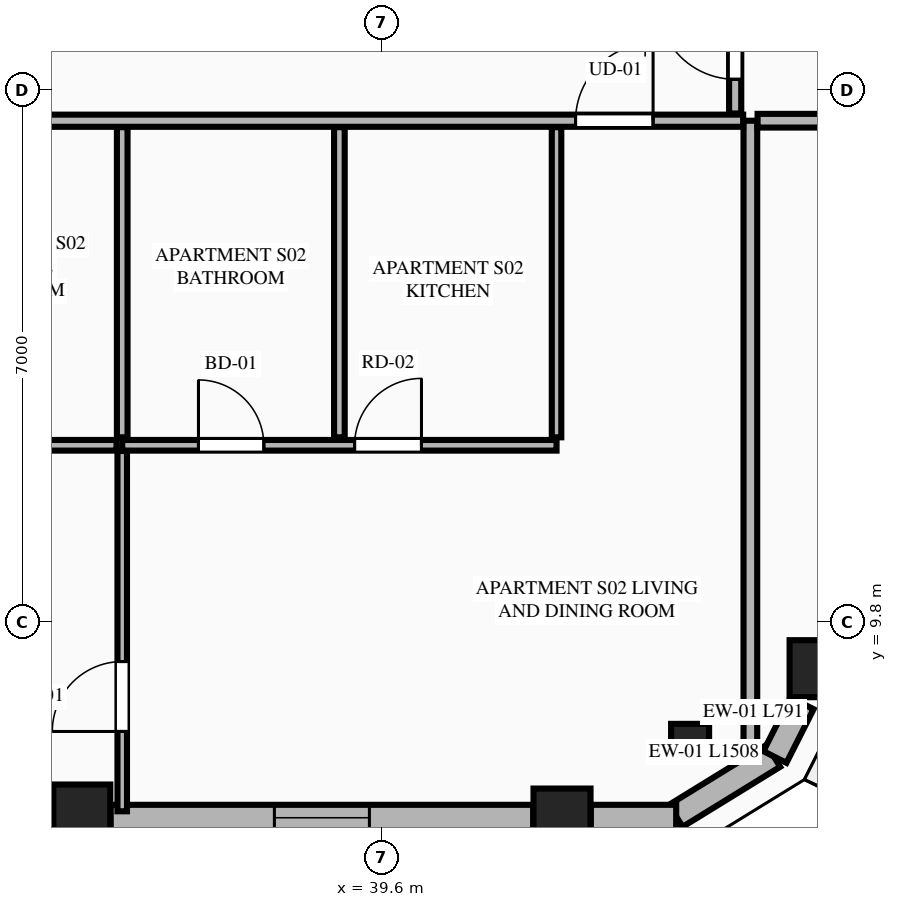
"""IFC4 building model, lengths in metres.
Left out: names, types, materials, properties, quantities, classifications, styles, units other than length and angle.
Written with IfcOpenShell. Run it as: python <this file> out.ifc"""

import sys

from ifc_helpers import new_model, si_unit, direction, frame, frame_2d, origin, origin_2d, place, context, subcontext, project, spatial, rectangle, extrude, element, fill, save


model = new_model("IFC4")
c1 = context("Model", 3, precision=1e-05, world=origin(), true_north=direction((0.0, 1.0)))
c2 = subcontext(c1, "Body", "Model", "MODEL_VIEW")
j1 = project(units=[si_unit("LENGTHUNIT", "METRE"), si_unit("PLANEANGLEUNIT", "RADIAN")], contexts=[c1])
p1 = place(None, origin())
s1 = spatial("IfcSite", under=j1, at=p1, CompositionType="ELEMENT")
p2 = place(p1, origin())
s2 = spatial("IfcBuilding", under=s1, at=p2, CompositionType="ELEMENT")
p3 = place(p2, frame((0.0, 0.0, 237.95)))
s3 = spatial("IfcBuildingStorey", under=s2, at=p3, CompositionType="ELEMENT", Elevation=237.95)
for number, where, z_axis, x_axis in (
    (1, (35.654, 7.292, 0.0), (0.0, 0.0, 1.0), (1.0, 0.0, 0.0)),
    (2, (41.972, 7.239, 0.0), (0.0, 0.0, 1.0), (1.0, 0.0, 0.0)),
    (3, (45.341, 9.191, 0.0), (0.0, 0.0, 1.0), (1.0, 0.0, 0.0)),
):
    element("IfcColumn", number, at=place(p3, frame(where, z_axis=z_axis, x_axis=x_axis)), inside=s3, PredefinedType="COLUMN", context=c2, shape_type="SweptSolid", body=[
        extrude(rectangle(XDim=0.75, YDim=0.75, at=origin_2d()), origin(), (0.0, 0.0, 1.0), 3.65),
    ])
p4 = place(p3, frame((43.657, 8.215, 0.0), z_axis=(0.0, 0.0, 1.0), x_axis=(0.865256437757, 0.501329529272, 0.0)))
e4 = element("IfcColumn", 4, at=p4, inside=s3, PredefinedType="PILASTER", context=c2, shape_type="SweptSolid", body=[
    extrude(rectangle(XDim=0.5, YDim=0.35, at=origin_2d()), origin(), (0.0, 0.0, 1.0), 3.65),
])
p5 = place(p3, frame((43.469, 7.255, 0.0), z_axis=(0.0, 0.0, 1.0), x_axis=(0.851680557619, 0.52406128246, 0.0)))
e5 = element("IfcWall", 5, at=p5, inside=s3, PredefinedType="STANDARD", context=c2, shape_type="SweptSolid", body=[
    extrude(rectangle(XDim=1.508, YDim=0.34, at=frame_2d((0.754, 0.0))), origin(), (0.0, 0.0, 1.0), 3.45),
])
p6 = place(p3, frame((29.525, 7.23, 0.0), z_axis=(0.0, 0.0, 1.0), x_axis=(1.0, 0.0, 0.0)))
e6 = element("IfcWall", 6, at=p6, inside=s3, PredefinedType="STANDARD", context=c2, shape_type="SweptSolid", body=[
    extrude(rectangle(XDim=5.75, YDim=0.34, at=frame_2d((2.875, 0.0))), origin(), (0.0, 0.0, 1.0), 2.983),
])
p7 = place(p6, frame((2.175, 0.0, 0.75)))
e7 = element("IfcOpeningElement", 7, at=p7, cuts=e6, PredefinedType="OPENING", context=c2, shape_type="SweptSolid", body=[
    extrude(rectangle(XDim=1.4, YDim=2.05, at=frame_2d((0.7, 1.025))), frame((0.0, 0.18, 0.0), z_axis=(0.0, -1.0, 0.0), x_axis=(1.0, 0.0, 0.0)), (0.0, 0.0, 1.0), 0.36),
])
p8 = place(p3, frame((36.033, 7.23, 0.0), z_axis=(0.0, 0.0, 1.0), x_axis=(1.0, 0.0, 0.0)))
e8 = element("IfcWall", 8, at=p8, inside=s3, PredefinedType="STANDARD", context=c2, shape_type="SweptSolid", body=[
    extrude(rectangle(XDim=5.56, YDim=0.34, at=frame_2d((2.78, 0.0))), origin(), (0.0, 0.0, 1.0), 2.983),
])
p9 = place(p8, frame((2.155, 0.0, 0.75)))
e9 = element("IfcOpeningElement", 9, at=p9, cuts=e8, PredefinedType="OPENING", context=c2, shape_type="SweptSolid", body=[
    extrude(rectangle(XDim=1.25, YDim=1.95, at=frame_2d((0.625, 0.975))), frame((0.0, 0.18, 0.0), z_axis=(0.0, -1.0, 0.0), x_axis=(1.0, 0.0, 0.0)), (0.0, 0.0, 1.0), 0.36),
])
p10 = place(p3, frame((42.351, 7.23, 0.0), z_axis=(0.0, 0.0, 1.0), x_axis=(1.0, 0.0, 0.0)))
e10 = element("IfcWall", 10, at=p10, inside=s3, PredefinedType="STANDARD", context=c2, shape_type="SweptSolid", body=[
    extrude(rectangle(XDim=1.123, YDim=0.34, at=frame_2d((0.562, 0.0))), origin(), (0.0, 0.0, 1.0), 3.45),
])
p11 = place(p3, frame((44.773, 8.029, 0.0), z_axis=(0.0, 0.0, 1.0), x_axis=(0.451159191899, 0.892443490404, 0.0)))
e11 = element("IfcWall", 11, at=p11, inside=s3, PredefinedType="STANDARD", context=c2, shape_type="SweptSolid", body=[
    extrude(rectangle(XDim=0.791, YDim=0.34, at=frame_2d((0.396, 0.0))), origin(), (0.0, 0.0, 1.0), 3.45),
])
p12 = place(p3, frame((44.45, 8.119, 0.0), z_axis=(0.0, 0.0, 1.0), x_axis=(0.0, 1.0, 0.0)))
e12 = element("IfcWall", 12, at=p12, inside=s3, PredefinedType="PARTITIONING", context=c2, shape_type="SweptSolid", body=[
    extrude(rectangle(XDim=8.281, YDim=0.18, at=frame_2d((4.141, 0.0))), origin(), (0.0, 0.0, 1.0), 3.45),
])
p13 = place(p3, frame((29.241, 16.4, 0.0), z_axis=(0.0, 0.0, 1.0), x_axis=(1.0, 0.0, 0.0)))
e13 = element("IfcWall", 13, at=p13, inside=s3, PredefinedType="PARTITIONING", context=c2, shape_type="SweptSolid", body=[
    extrude(rectangle(XDim=15.114, YDim=0.16, at=frame_2d((7.557, 0.0))), origin(), (0.0, 0.0, 1.0), 3.45),
])
p14 = place(p13, frame((12.909, 0.0, 0.0)))
e14 = element("IfcOpeningElement", 14, at=p14, cuts=e13, PredefinedType="OPENING", context=c2, shape_type="SweptSolid", body=[
    extrude(rectangle(XDim=1.02, YDim=2.25, at=frame_2d((0.51, 1.125))), frame((0.0, 0.09, 0.0), z_axis=(0.0, -1.0, 0.0), x_axis=(1.0, 0.0, 0.0)), (0.0, 0.0, 1.0), 0.18),
])
p15 = place(p3, frame((41.9, 12.235, 0.0), z_axis=(0.0, 0.0, 1.0), x_axis=(0.0, 1.0, 0.0)))
e15 = element("IfcWall", 15, at=p15, inside=s3, PredefinedType="PARTITIONING", context=c2, shape_type="SweptSolid", body=[
    extrude(rectangle(XDim=4.08, YDim=0.125, at=frame_2d((2.04, 0.0))), origin(), (0.0, 0.0, 1.0), 2.907),
])
p16 = place(p3, frame((36.186, 12.13, 0.0), z_axis=(0.0, 0.0, 1.0), x_axis=(1.0, 0.0, 0.0)))
e16 = element("IfcWall", 16, at=p16, inside=s3, PredefinedType="PLUMBINGWALL", context=c2, shape_type="SweptSolid", body=[
    extrude(rectangle(XDim=5.714, YDim=0.14, at=frame_2d((2.857, 0.0))), origin(), (0.0, 0.0, 1.0), 3.45),
])
p17 = place(p16, frame((1.003, 0.0, 0.0)))
e17 = element("IfcOpeningElement", 17, at=p17, cuts=e16, PredefinedType="OPENING", context=c2, shape_type="SweptSolid", body=[
    extrude(rectangle(XDim=0.86, YDim=2.1, at=frame_2d((0.43, 1.05))), frame((0.0, 0.08, 0.0), z_axis=(0.0, -1.0, 0.0), x_axis=(1.0, 0.0, 0.0)), (0.0, 0.0, 1.0), 0.16),
])
p18 = place(p16, frame((3.057, 0.0, 0.0)))
e18 = element("IfcOpeningElement", 18, at=p18, cuts=e16, PredefinedType="OPENING", context=c2, shape_type="SweptSolid", body=[
    extrude(rectangle(XDim=0.88, YDim=2.15, at=frame_2d((0.44, 1.075))), frame((0.0, 0.08, 0.0), z_axis=(0.0, -1.0, 0.0), x_axis=(1.0, 0.0, 0.0)), (0.0, 0.0, 1.0), 0.16),
])
p19 = place(p3, frame((29.241, 12.13, 0.0), z_axis=(0.0, 0.0, 1.0), x_axis=(1.0, 0.0, 0.0)))
e19 = element("IfcWall", 19, at=p19, inside=s3, PredefinedType="PLUMBINGWALL", context=c2, shape_type="SweptSolid", body=[
    extrude(rectangle(XDim=6.87, YDim=0.14, at=frame_2d((3.435, 0.0))), origin(), (0.0, 0.0, 1.0), 3.45),
])
p20 = place(p19, frame((0.28, 0.0, 0.0)))
e20 = element("IfcOpeningElement", 20, at=p20, cuts=e19, PredefinedType="OPENING", context=c2, shape_type="SweptSolid", body=[
    extrude(rectangle(XDim=0.88, YDim=2.15, at=frame_2d((0.44, 1.075))), frame((0.0, 0.08, 0.0), z_axis=(0.0, -1.0, 0.0), x_axis=(1.0, 0.0, 0.0)), (0.0, 0.0, 1.0), 0.16),
])
p21 = place(p19, frame((4.352, 0.0, 0.0)))
e21 = element("IfcOpeningElement", 21, at=p21, cuts=e19, PredefinedType="OPENING", context=c2, shape_type="SweptSolid", body=[
    extrude(rectangle(XDim=0.86, YDim=2.1, at=frame_2d((0.43, 1.05))), frame((0.0, 0.08, 0.0), z_axis=(0.0, -1.0, 0.0), x_axis=(1.0, 0.0, 0.0)), (0.0, 0.0, 1.0), 0.16),
])
for number, where, z_axis, x_axis in (
    (22, (39.043, 12.235, 0.0), (0.0, 0.0, 1.0), (0.0, 1.0, 0.0)),
    (23, (36.186, 12.235, 0.0), (0.0, 0.0, 1.0), (0.0, 1.0, 0.0)),
):
    element("IfcWall", number, at=place(p3, frame(where, z_axis=z_axis, x_axis=x_axis)), inside=s3, PredefinedType="PLUMBINGWALL", context=c2, shape_type="SweptSolid", body=[
        extrude(rectangle(XDim=4.08, YDim=0.14, at=frame_2d((2.04, 0.0))), origin(), (0.0, 0.0, 1.0), 3.45),
    ])
p22 = place(p3, frame((36.186, 7.315, 0.0), z_axis=(0.0, 0.0, 1.0), x_axis=(0.0, 1.0, 0.0)))
e24 = element("IfcWall", 24, at=p22, inside=s3, PredefinedType="PARTITIONING", context=c2, shape_type="SweptSolid", body=[
    extrude(rectangle(XDim=4.74, YDim=0.125, at=frame_2d((2.37, 0.0))), origin(), (0.0, 0.0, 1.0), 3.45),
])
p23 = place(p22, frame((1.05, 0.0, 0.0)))
e25 = element("IfcOpeningElement", 25, at=p23, cuts=e24, PredefinedType="OPENING", context=c2, shape_type="SweptSolid", body=[
    extrude(rectangle(XDim=0.92, YDim=2.15, at=frame_2d((0.46, 1.075))), frame((0.0, 0.073, 0.0), z_axis=(0.0, -1.0, 0.0), x_axis=(1.0, 0.0, 0.0)), (0.0, 0.0, 1.0), 0.145),
])
p24 = place(p3, frame((44.545, 16.4, 0.0), z_axis=(0.0, 0.0, 1.0), x_axis=(1.0, 0.0, 0.0)))
e26 = element("IfcWall", 26, at=p24, inside=s3, PredefinedType="PARTITIONING", context=c2, shape_type="SweptSolid", body=[
    extrude(rectangle(XDim=4.221, YDim=0.18, at=frame_2d((2.111, 0.0))), origin(), (0.0, 0.0, 1.0), 3.45),
])
p25 = place(p3, frame((44.25, 16.495, 0.0), z_axis=(0.0, 0.0, 1.0), x_axis=(0.0, 1.0, 0.0)))
e27 = element("IfcWall", 27, at=p25, inside=s3, PredefinedType="PARTITIONING", context=c2, shape_type="SweptSolid", body=[
    extrude(rectangle(XDim=18.41, YDim=0.16, at=frame_2d((9.205, 0.0))), origin(), (0.0, 0.0, 1.0), 3.137),
])
p26 = place(p25, frame((0.45, 0.0, 0.0)))
e28 = element("IfcOpeningElement", 28, at=p26, cuts=e27, PredefinedType="OPENING", context=c2, shape_type="SweptSolid", body=[
    extrude(rectangle(XDim=1.02, YDim=2.25, at=frame_2d((0.51, 1.125))), frame((0.0, 0.09, 0.0), z_axis=(0.0, -1.0, 0.0), x_axis=(1.0, 0.0, 0.0)), (0.0, 0.0, 1.0), 0.18),
])
p27 = place(p9, origin())
e29 = element("IfcWindow", 29, at=p27, inside=s3, PartitioningType="SINGLE_PANEL", PredefinedType="WINDOW", context=c2, shape_type="SweptSolid", body=[
    extrude(rectangle(XDim=1.25, YDim=1.95, at=frame_2d((0.625, 0.975))), frame((0.0, 0.03, 0.0), z_axis=(0.0, -1.0, 0.0), x_axis=(1.0, 0.0, 0.0)), (0.0, 0.0, 1.0), 0.06),
])
fill(e9, e29)
p28 = place(p17, origin())
e30 = element("IfcDoor", 30, at=p28, inside=s3, OperationType="SINGLE_SWING_LEFT", PredefinedType="DOOR", context=c2, shape_type="SweptSolid", body=[
    extrude(rectangle(XDim=0.86, YDim=2.1, at=frame_2d((0.43, 1.05))), frame((0.0, 0.025, 0.0), z_axis=(0.0, -1.0, 0.0), x_axis=(1.0, 0.0, 0.0)), (0.0, 0.0, 1.0), 0.05),
])
fill(e17, e30)
p29 = place(p14, origin())
e31 = element("IfcDoor", 31, at=p29, inside=s3, OperationType="SINGLE_SWING_RIGHT", PredefinedType="DOOR", context=c2, shape_type="SweptSolid", body=[
    extrude(rectangle(XDim=1.02, YDim=2.25, at=frame_2d((0.51, 1.125))), frame((0.0, 0.025, 0.0), z_axis=(0.0, -1.0, 0.0), x_axis=(1.0, 0.0, 0.0)), (0.0, 0.0, 1.0), 0.05),
])
fill(e14, e31)
p30 = place(p18, origin())
e32 = element("IfcDoor", 32, at=p30, inside=s3, OperationType="SINGLE_SWING_RIGHT", PredefinedType="DOOR", context=c2, shape_type="SweptSolid", body=[
    extrude(rectangle(XDim=0.88, YDim=2.15, at=frame_2d((0.44, 1.075))), frame((0.0, 0.025, 0.0), z_axis=(0.0, -1.0, 0.0), x_axis=(1.0, 0.0, 0.0)), (0.0, 0.0, 1.0), 0.05),
])
fill(e18, e32)
p31 = place(p23, origin())
e33 = element("IfcDoor", 33, at=p31, inside=s3, OperationType="SINGLE_SWING_LEFT", PredefinedType="DOOR", context=c2, shape_type="SweptSolid", body=[
    extrude(rectangle(XDim=0.92, YDim=2.15, at=frame_2d((0.46, 1.075))), frame((0.0, 0.025, 0.0), z_axis=(0.0, -1.0, 0.0), x_axis=(1.0, 0.0, 0.0)), (0.0, 0.0, 1.0), 0.05),
])
fill(e25, e33)
p32 = place(p26, origin())
e34 = element("IfcDoor", 34, at=p32, inside=s3, OperationType="SINGLE_SWING_RIGHT", PredefinedType="DOOR", context=c2, shape_type="SweptSolid", body=[
    extrude(rectangle(XDim=1.02, YDim=2.25, at=frame_2d((0.51, 1.125))), frame((0.0, 0.025, 0.0), z_axis=(0.0, -1.0, 0.0), x_axis=(1.0, 0.0, 0.0)), (0.0, 0.0, 1.0), 0.05),
])
fill(e28, e34)
save(model, sys.argv[1])
